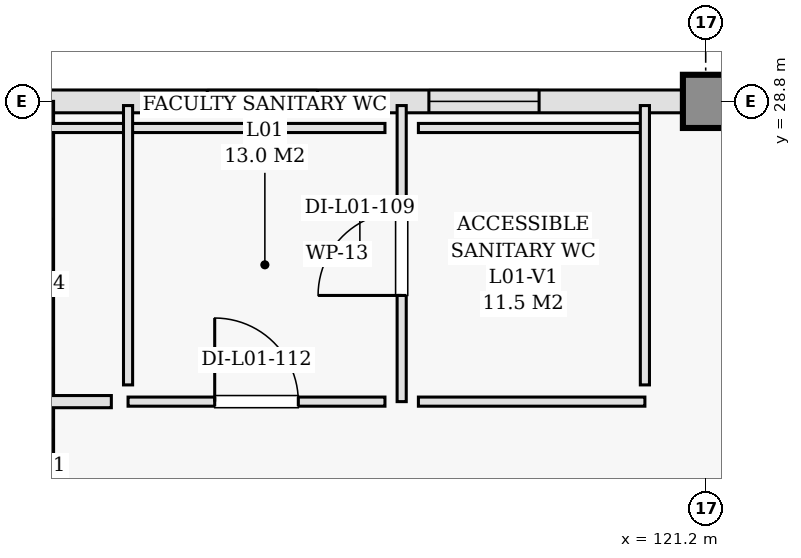
"""IFC4 building model, lengths in metres.
Left out: names, types, materials, properties, quantities, classifications, styles, units other than length and angle.
Written with IfcOpenShell. Run it as: python <this file> out.ifc"""

import sys

from ifc_helpers import new_model, si_unit, direction, frame, frame_2d, origin, origin_2d, place, context, subcontext, project, spatial, rectangle, extrude, element, fill, save


model = new_model("IFC4")
c1 = context("Model", 3, precision=1e-05, world=origin(), true_north=direction((0.0, 1.0)))
c2 = subcontext(c1, "Body", "Model", "MODEL_VIEW")
j1 = project(units=[si_unit("LENGTHUNIT", "METRE"), si_unit("PLANEANGLEUNIT", "RADIAN")], contexts=[c1])
p1 = place(None, origin())
s1 = spatial("IfcSite", under=j1, at=p1, CompositionType="ELEMENT")
p2 = place(p1, origin())
s2 = spatial("IfcBuilding", under=s1, at=p2, CompositionType="ELEMENT")
p3 = place(p2, frame((0.0, 0.0, 4.8)))
s3 = spatial("IfcBuildingStorey", under=s2, at=p3, CompositionType="ELEMENT", Elevation=4.8)
p4 = place(p3, frame((121.2, 28.8, 0.0), z_axis=(0.0, 0.0, 1.0), x_axis=(1.0, 0.0, 0.0)))
e1 = element("IfcColumn", 1, at=p4, inside=s3, PredefinedType="COLUMN", context=c2, shape_type="SweptSolid", body=[
    extrude(rectangle(XDim=0.7, YDim=0.7, at=origin_2d()), origin(), (0.0, 0.0, 1.0), 4.8),
])
p5 = place(p3, frame((130.2, 28.8, 0.0), z_axis=(0.0, 0.0, 1.0), x_axis=(-1.0, 0.0, 0.0)))
e2 = element("IfcWall", 2, at=p5, inside=s3, PredefinedType="SOLIDWALL", context=c2, shape_type="SweptSolid", body=[
    extrude(rectangle(XDim=9.0, YDim=0.34, at=frame_2d((4.5, 0.0))), origin(), (0.0, 0.0, 1.0), 3.665),
])
p6 = place(p5, frame((2.575, 0.0, 0.9)))
e3 = element("IfcOpeningElement", 3, at=p6, cuts=e2, PredefinedType="OPENING", context=c2, shape_type="SweptSolid", body=[
    extrude(rectangle(XDim=0.85, YDim=1.3, at=frame_2d((0.425, 0.65))), frame((0.0, 0.18, 0.0), z_axis=(0.0, -1.0, 0.0), x_axis=(1.0, 0.0, 0.0)), (0.0, 0.0, 1.0), 0.36),
])
p7 = place(p5, frame((5.575, 0.0, 0.9)))
e4 = element("IfcOpeningElement", 4, at=p7, cuts=e2, PredefinedType="OPENING", context=c2, shape_type="SweptSolid", body=[
    extrude(rectangle(XDim=0.85, YDim=1.3, at=frame_2d((0.425, 0.65))), frame((0.0, 0.18, 0.0), z_axis=(0.0, -1.0, 0.0), x_axis=(1.0, 0.0, 0.0)), (0.0, 0.0, 1.0), 0.36),
])
p8 = place(p3, frame((121.2, 28.8, 0.0), z_axis=(0.0, 0.0, 1.0), x_axis=(-1.0, 0.0, 0.0)))
e5 = element("IfcWall", 5, at=p8, inside=s3, PredefinedType="SOLIDWALL", context=c2, shape_type="SweptSolid", body=[
    extrude(rectangle(XDim=8.75, YDim=0.3, at=frame_2d((4.375, 0.0))), origin(), (0.0, 0.0, 1.0), 3.665),
])
p9 = place(p8, frame((2.192, 0.0, 0.9)))
e6 = element("IfcOpeningElement", 6, at=p9, cuts=e5, PredefinedType="OPENING", context=c2, shape_type="SweptSolid", body=[
    extrude(rectangle(XDim=1.45, YDim=1.6, at=frame_2d((0.725, 0.8))), frame((0.0, 0.16, 0.0), z_axis=(0.0, -1.0, 0.0), x_axis=(1.0, 0.0, 0.0)), (0.0, 0.0, 1.0), 0.32),
])
p10 = place(p8, frame((5.108, 0.0, 0.9)))
e7 = element("IfcOpeningElement", 7, at=p10, cuts=e5, PredefinedType="OPENING", context=c2, shape_type="SweptSolid", body=[
    extrude(rectangle(XDim=1.45, YDim=1.6, at=frame_2d((0.725, 0.8))), frame((0.0, 0.16, 0.0), z_axis=(0.0, -1.0, 0.0), x_axis=(1.0, 0.0, 0.0)), (0.0, 0.0, 1.0), 0.32),
])
p11 = place(p3, frame((112.45, 28.8, 0.0), z_axis=(0.0, 0.0, 1.0), x_axis=(0.0, -1.0, 0.0)))
e8 = element("IfcWall", 8, at=p11, inside=s3, PredefinedType="SOLIDWALL", context=c2, shape_type="SweptSolid", body=[
    extrude(rectangle(XDim=7.2, YDim=0.34, at=frame_2d((3.6, 0.0))), origin(), (0.0, 0.0, 1.0), 3.665),
])
p12 = place(p11, frame((1.55, 0.0, 0.85)))
e9 = element("IfcOpeningElement", 9, at=p12, cuts=e8, PredefinedType="OPENING", context=c2, shape_type="SweptSolid", body=[
    extrude(rectangle(XDim=1.7, YDim=1.85, at=frame_2d((0.85, 0.925))), frame((0.0, 0.18, 0.0), z_axis=(0.0, -1.0, 0.0), x_axis=(1.0, 0.0, 0.0)), (0.0, 0.0, 1.0), 0.36),
])
p13 = place(p11, frame((4.325, 0.0, 0.85)))
e10 = element("IfcOpeningElement", 10, at=p13, cuts=e8, PredefinedType="OPENING", context=c2, shape_type="SweptSolid", body=[
    extrude(rectangle(XDim=0.95, YDim=1.35, at=frame_2d((0.475, 0.675))), frame((0.0, 0.18, 0.0), z_axis=(0.0, -1.0, 0.0), x_axis=(1.0, 0.0, 0.0)), (0.0, 0.0, 1.0), 0.36),
])
p14 = place(p3, frame((117.2, 24.85, 0.0), z_axis=(0.0, 0.0, 1.0), x_axis=(0.0, 1.0, 0.0)))
e11 = element("IfcWall", 11, at=p14, inside=s3, PredefinedType="PARTITIONING", context=c2, shape_type="SweptSolid", body=[
    extrude(rectangle(XDim=3.895, YDim=0.12, at=frame_2d((1.948, 0.0))), origin(), (0.0, 0.0, 1.0), 3.665),
])
p15 = place(p14, frame((1.397, 0.0, 0.0)))
e12 = element("IfcOpeningElement", 12, at=p15, cuts=e11, PredefinedType="OPENING", context=c2, shape_type="SweptSolid", body=[
    extrude(rectangle(XDim=1.1, YDim=2.15, at=frame_2d((0.55, 1.075))), frame((0.0, 0.07, 0.0), z_axis=(0.0, -1.0, 0.0), x_axis=(1.0, 0.0, 0.0)), (0.0, 0.0, 1.0), 0.14),
])
for number, where, z_axis, x_axis in (
    (13, (117.42, 24.85, 0.0), (0.0, 0.0, 1.0), (1.0, 0.0, 0.0)),
    (14, (117.42, 28.45, 0.0), (0.0, 0.0, 1.0), (1.0, 0.0, 0.0)),
):
    element("IfcWall", number, at=place(p3, frame(where, z_axis=z_axis, x_axis=x_axis)), inside=s3, PredefinedType="PARTITIONING", context=c2, shape_type="SweptSolid", body=[
        extrude(rectangle(XDim=2.98, YDim=0.12, at=frame_2d((1.49, 0.0))), origin(), (0.0, 0.0, 1.0), 4.48),
    ])
p16 = place(p3, frame((120.4, 25.07, 0.0), z_axis=(0.0, 0.0, 1.0), x_axis=(0.0, 1.0, 0.0)))
e15 = element("IfcWall", 15, at=p16, inside=s3, PredefinedType="PARTITIONING", context=c2, shape_type="SweptSolid", body=[
    extrude(rectangle(XDim=3.675, YDim=0.12, at=frame_2d((1.837, 0.0))), origin(), (0.0, 0.0, 1.0), 3.665),
])
p17 = place(p3, frame((112.505, 28.45, 0.0), z_axis=(0.0, 0.0, 1.0), x_axis=(1.0, 0.0, 0.0)))
e16 = element("IfcWall", 16, at=p17, inside=s3, PredefinedType="PARTITIONING", context=c2, shape_type="SweptSolid", body=[
    extrude(rectangle(XDim=4.475, YDim=0.12, at=frame_2d((2.238, 0.0))), origin(), (0.0, 0.0, 1.0), 4.48),
])
p18 = place(p3, frame((113.6, 24.85, 0.0), z_axis=(0.0, 0.0, 1.0), x_axis=(1.0, 0.0, 0.0)))
e17 = element("IfcWall", 17, at=p18, inside=s3, PredefinedType="PARTITIONING", context=c2, shape_type="SweptSolid", body=[
    extrude(rectangle(XDim=3.38, YDim=0.12, at=frame_2d((1.69, 0.0))), origin(), (0.0, 0.0, 1.0), 4.48),
])
p19 = place(p18, frame((1.14, 0.0, 0.0)))
e18 = element("IfcOpeningElement", 18, at=p19, cuts=e17, PredefinedType="OPENING", context=c2, shape_type="SweptSolid", body=[
    extrude(rectangle(XDim=1.1, YDim=2.15, at=frame_2d((0.55, 1.075))), frame((0.0, 0.07, 0.0), z_axis=(0.0, -1.0, 0.0), x_axis=(1.0, 0.0, 0.0)), (0.0, 0.0, 1.0), 0.14),
])
p20 = place(p3, frame((113.6, 25.07, 0.0), z_axis=(0.0, 0.0, 1.0), x_axis=(0.0, 1.0, 0.0)))
e19 = element("IfcWall", 19, at=p20, inside=s3, PredefinedType="PARTITIONING", context=c2, shape_type="SweptSolid", body=[
    extrude(rectangle(XDim=3.675, YDim=0.12, at=frame_2d((1.837, 0.0))), origin(), (0.0, 0.0, 1.0), 3.665),
])
p21 = place(p3, frame((112.505, 24.85, 0.0), z_axis=(0.0, 0.0, 1.0), x_axis=(1.0, 0.0, 0.0)))
e20 = element("IfcWall", 20, at=p21, inside=s3, PredefinedType="PARTITIONING", context=c2, shape_type="SweptSolid", body=[
    extrude(rectangle(XDim=0.875, YDim=0.16, at=frame_2d((0.438, 0.0))), origin(), (0.0, 0.0, 1.0), 4.48),
])
p22 = place(p9, origin())
e21 = element("IfcWindow", 21, at=p22, inside=s3, PartitioningType="DOUBLE_PANEL_VERTICAL", PredefinedType="WINDOW", context=c2, shape_type="SweptSolid", body=[
    extrude(rectangle(XDim=1.45, YDim=1.6, at=frame_2d((0.725, 0.8))), frame((0.0, 0.03, 0.0), z_axis=(0.0, -1.0, 0.0), x_axis=(1.0, 0.0, 0.0)), (0.0, 0.0, 1.0), 0.06),
])
fill(e6, e21)
p23 = place(p10, origin())
e22 = element("IfcWindow", 22, at=p23, inside=s3, PartitioningType="DOUBLE_PANEL_VERTICAL", PredefinedType="WINDOW", context=c2, shape_type="SweptSolid", body=[
    extrude(rectangle(XDim=1.45, YDim=1.6, at=frame_2d((0.725, 0.8))), frame((0.0, 0.03, 0.0), z_axis=(0.0, -1.0, 0.0), x_axis=(1.0, 0.0, 0.0)), (0.0, 0.0, 1.0), 0.06),
])
fill(e7, e22)
p24 = place(p15, origin())
e23 = element("IfcDoor", 23, at=p24, inside=s3, OperationType="SINGLE_SWING_LEFT", PredefinedType="DOOR", context=c2, shape_type="SweptSolid", body=[
    extrude(rectangle(XDim=1.1, YDim=2.15, at=frame_2d((0.55, 1.075))), frame((0.0, 0.025, 0.0), z_axis=(0.0, -1.0, 0.0), x_axis=(1.0, 0.0, 0.0)), (0.0, 0.0, 1.0), 0.05),
])
fill(e12, e23)
p25 = place(p19, origin())
e24 = element("IfcDoor", 24, at=p25, inside=s3, OperationType="SINGLE_SWING_LEFT", PredefinedType="DOOR", context=c2, shape_type="SweptSolid", body=[
    extrude(rectangle(XDim=1.1, YDim=2.15, at=frame_2d((0.55, 1.075))), frame((0.0, 0.025, 0.0), z_axis=(0.0, -1.0, 0.0), x_axis=(1.0, 0.0, 0.0)), (0.0, 0.0, 1.0), 0.05),
])
fill(e18, e24)
save(model, sys.argv[1])
